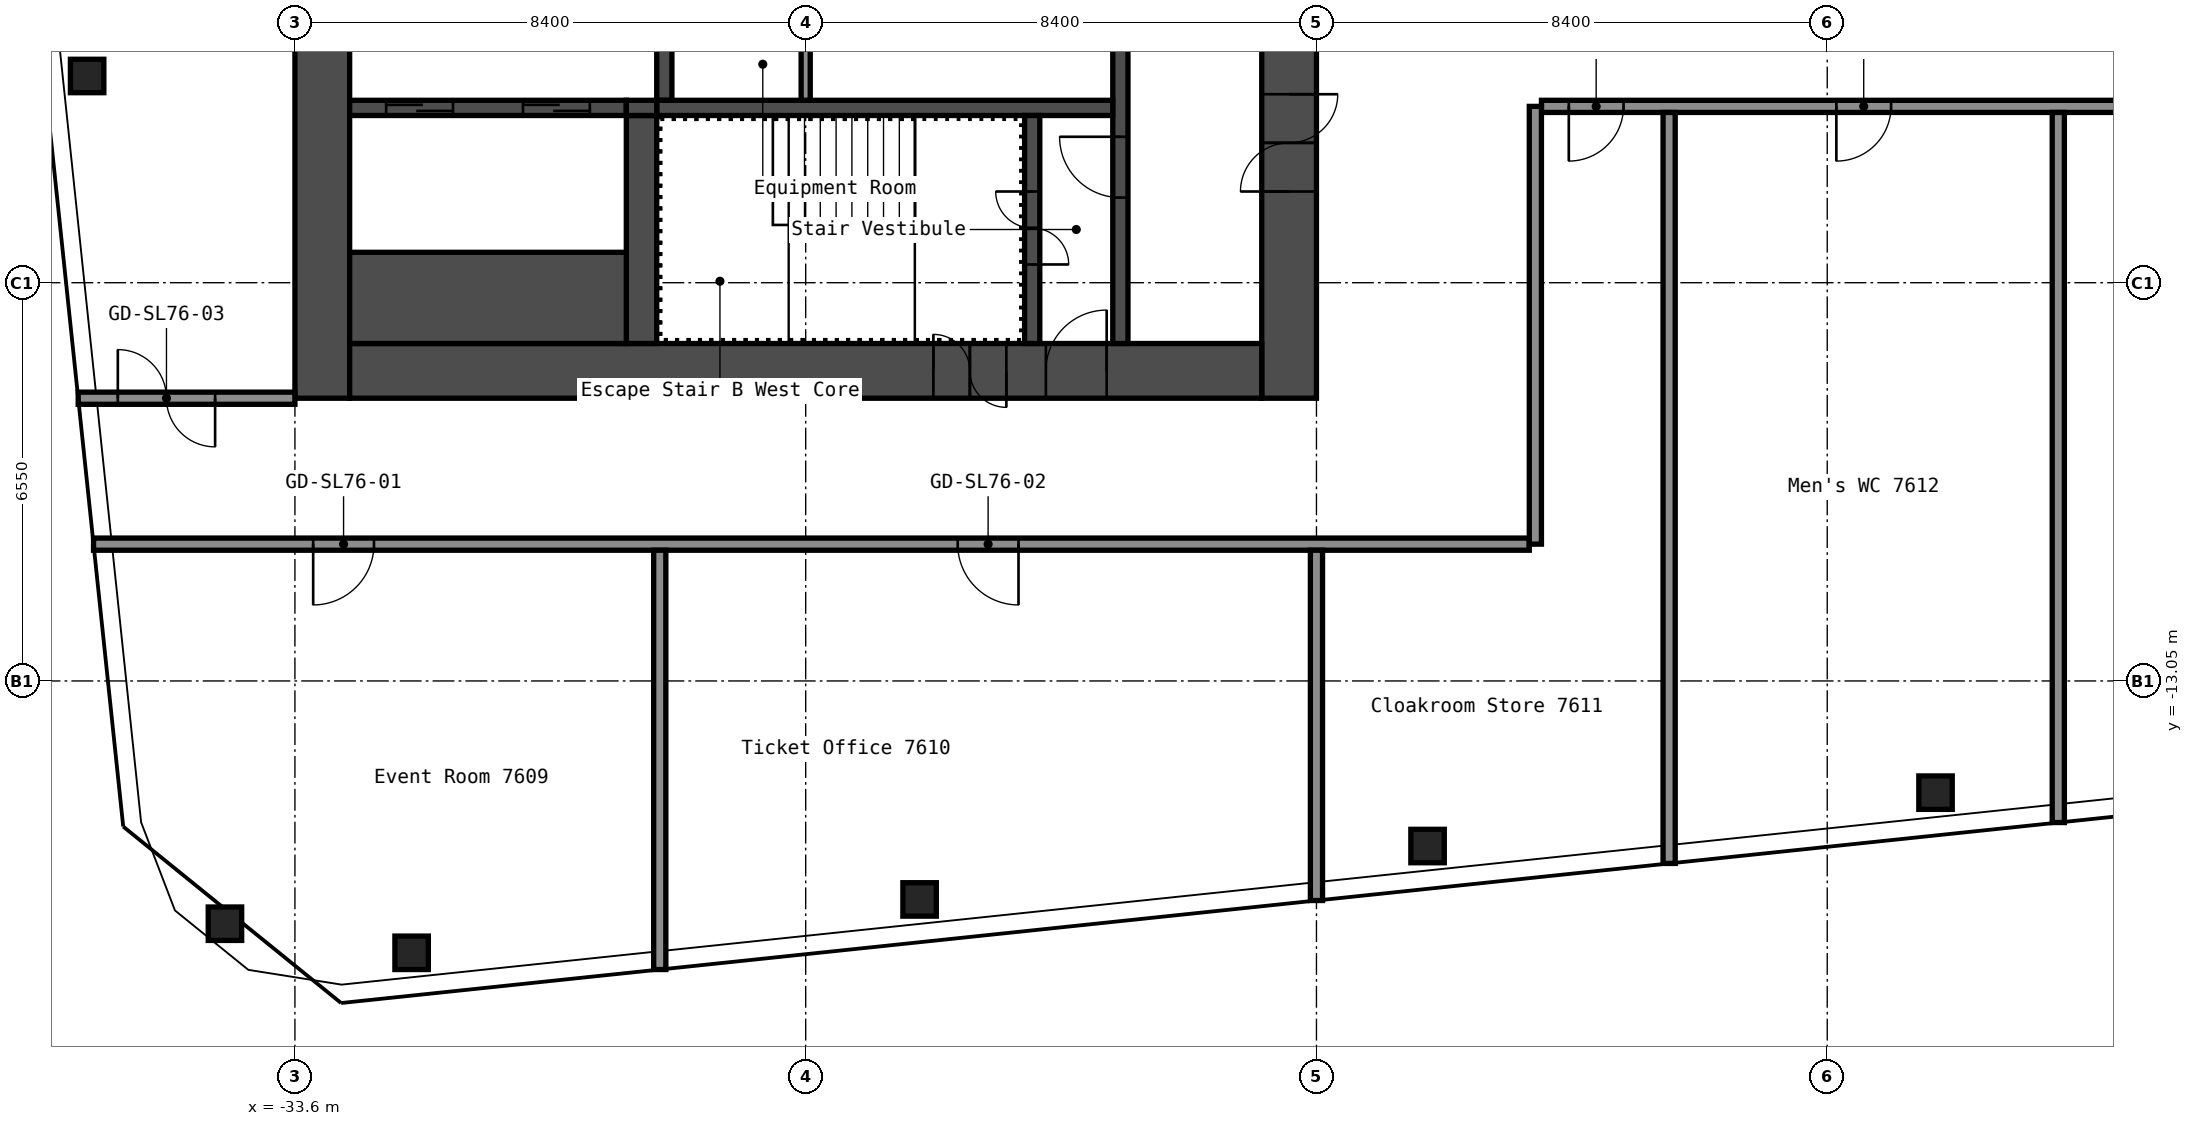
"""IFC4 building model, lengths in metres.
Left out: names, types, materials, properties, quantities, classifications, styles, units other than length and angle.
Written with IfcOpenShell. Run it as: python <this file> out.ifc"""

import sys

from ifc_helpers import new_model, si_unit, direction, frame, frame_2d, origin, origin_2d, place, context, subcontext, project, spatial, rectangle, hollow_rectangle, extrude, element, fill, save


model = new_model("IFC4")
c1 = context("Model", 3, precision=1e-05, world=origin(), true_north=direction((0.0, 1.0)))
c2 = subcontext(c1, "Body", "Model", "MODEL_VIEW")
j1 = project(units=[si_unit("LENGTHUNIT", "METRE"), si_unit("PLANEANGLEUNIT", "RADIAN")], contexts=[c1])
p1 = place(None, origin())
s1 = spatial("IfcSite", under=j1, at=p1, CompositionType="ELEMENT")
p2 = place(p1, origin())
s2 = spatial("IfcBuilding", under=s1, at=p2, CompositionType="ELEMENT")
p3 = place(p2, frame((0.0, 0.0, 270.6)))
s3 = spatial("IfcBuildingStorey", under=s2, at=p3, CompositionType="ELEMENT", Elevation=270.6)
for number, where, z_axis, x_axis in (
    (1, (-34.751, -17.042, 0.0), (0.0, 0.0, 1.0), (1.0, 0.0, 0.0)),
    (2, (-37.017, -3.1, 0.0), (0.0, 0.0, 1.0), (1.0, 0.0, 0.0)),
    (3, (-31.681, -17.521, 0.0), (0.0, 0.0, 1.0), (1.0, 0.0, 0.0)),
    (4, (-23.327, -16.643, 0.0), (0.0, 0.0, 1.0), (1.0, 0.0, 0.0)),
    (5, (-14.973, -15.765, 0.0), (0.0, 0.0, 1.0), (1.0, 0.0, 0.0)),
    (6, (-6.619, -14.887, 0.0), (0.0, 0.0, 1.0), (1.0, 0.0, 0.0)),
):
    element("IfcColumn", number, at=place(p3, frame(where, z_axis=z_axis, x_axis=x_axis)), inside=s3, PredefinedType="COLUMN", context=c2, shape_type="SweptSolid", body=[
        extrude(hollow_rectangle(XDim=0.55, YDim=0.55, WallThickness=0.022, InnerFilletRadius=0.033, OuterFilletRadius=0.055, at=origin_2d()), origin(), (0.0, 0.0, 1.0), 5.55),
    ])
p4 = place(p3, frame((-17.25, -8.4, 0.0), z_axis=(0.0, 0.0, 1.0), x_axis=(0.0, 1.0, 0.0)))
e7 = element("IfcWall", 7, at=p4, inside=s3, PredefinedType="SHEAR", context=c2, shape_type="SweptSolid", body=[
    extrude(rectangle(XDim=16.8, YDim=0.9, at=frame_2d((8.4, 0.0))), origin(), (0.0, 0.0, 1.0), 5.55),
])
p5 = place(p4, frame((3.4, 0.0, 0.0)))
e8 = element("IfcOpeningElement", 8, at=p5, cuts=e7, PredefinedType="OPENING", context=c2, shape_type="SweptSolid", body=[
    extrude(rectangle(XDim=1.6, YDim=2.1, at=frame_2d((0.8, 1.05))), frame((0.0, 0.46, 0.0), z_axis=(0.0, -1.0, 0.0), x_axis=(1.0, 0.0, 0.0)), (0.0, 0.0, 1.0), 0.92),
])
p6 = place(p4, frame((9.6, 0.0, 0.0)))
e9 = element("IfcOpeningElement", 9, at=p6, cuts=e7, PredefinedType="OPENING", context=c2, shape_type="SweptSolid", body=[
    extrude(rectangle(XDim=1.6, YDim=2.1, at=frame_2d((0.8, 1.05))), frame((0.0, 0.46, 0.0), z_axis=(0.0, -1.0, 0.0), x_axis=(1.0, 0.0, 0.0)), (0.0, 0.0, 1.0), 0.92),
])
p7 = place(p4, frame((11.8, 0.0, 0.0)))
e10 = element("IfcOpeningElement", 10, at=p7, cuts=e7, PredefinedType="OPENING", context=c2, shape_type="SweptSolid", body=[
    extrude(rectangle(XDim=1.6, YDim=2.1, at=frame_2d((0.8, 1.05))), frame((0.0, 0.46, 0.0), z_axis=(0.0, -1.0, 0.0), x_axis=(1.0, 0.0, 0.0)), (0.0, 0.0, 1.0), 0.92),
])
p8 = place(p3, frame((-33.15, -8.4, 0.0), z_axis=(0.0, 0.0, 1.0), x_axis=(0.0, 1.0, 0.0)))
e11 = element("IfcWall", 11, at=p8, inside=s3, PredefinedType="SHEAR", context=c2, shape_type="SweptSolid", body=[
    extrude(rectangle(XDim=16.8, YDim=0.9, at=frame_2d((8.4, 0.0))), origin(), (0.0, 0.0, 1.0), 5.55),
])
p9 = place(p3, frame((-32.7, -7.95, 0.0), z_axis=(0.0, 0.0, 1.0), x_axis=(1.0, 0.0, 0.0)))
e12 = element("IfcWall", 12, at=p9, inside=s3, PredefinedType="SHEAR", context=c2, shape_type="SweptSolid", body=[
    extrude(rectangle(XDim=15.0, YDim=0.9, at=frame_2d((7.5, 0.0))), origin(), (0.0, 0.0, 1.0), 5.55),
])
p10 = place(p9, frame((11.45, 0.0, 0.0)))
e13 = element("IfcOpeningElement", 13, at=p10, cuts=e12, PredefinedType="OPENING", context=c2, shape_type="SweptSolid", body=[
    extrude(rectangle(XDim=1.0, YDim=2.1, at=frame_2d((0.5, 1.05))), frame((0.0, 0.46, 0.0), z_axis=(0.0, -1.0, 0.0), x_axis=(1.0, 0.0, 0.0)), (0.0, 0.0, 1.0), 0.92),
])
p11 = place(p9, frame((9.6, 0.0, 0.0)))
e14 = element("IfcOpeningElement", 14, at=p11, cuts=e12, PredefinedType="OPENING", context=c2, shape_type="SweptSolid", body=[
    extrude(rectangle(XDim=1.2, YDim=2.1, at=frame_2d((0.6, 1.05))), frame((0.0, 0.46, 0.0), z_axis=(0.0, -1.0, 0.0), x_axis=(1.0, 0.0, 0.0)), (0.0, 0.0, 1.0), 0.92),
])
p12 = place(p3, frame((-20.025, -7.5, 0.0), z_axis=(0.0, 0.0, 1.0), x_axis=(0.0, 1.0, 0.0)))
e15 = element("IfcWall", 15, at=p12, inside=s3, PredefinedType="SHEAR", context=c2, shape_type="SweptSolid", body=[
    extrude(rectangle(XDim=6.3, YDim=0.25, at=frame_2d((3.15, 0.0))), origin(), (0.0, 0.0, 1.0), 5.55),
])
p13 = place(p12, frame((2.4, 0.0, 0.0)))
e16 = element("IfcOpeningElement", 16, at=p13, cuts=e15, PredefinedType="OPENING", context=c2, shape_type="SweptSolid", body=[
    extrude(rectangle(XDim=1.0, YDim=2.1, at=frame_2d((0.5, 1.05))), frame((0.0, 0.135, 0.0), z_axis=(0.0, -1.0, 0.0), x_axis=(1.0, 0.0, 0.0)), (0.0, 0.0, 1.0), 0.27),
])
p14 = place(p3, frame((-27.525, -3.5, 0.0), z_axis=(0.0, 0.0, 1.0), x_axis=(0.0, 1.0, 0.0)))
e17 = element("IfcWall", 17, at=p14, inside=s3, PredefinedType="SHEAR", context=c2, shape_type="SweptSolid", body=[
    extrude(rectangle(XDim=2.05, YDim=0.25, at=frame_2d((1.025, 0.0))), origin(), (0.0, 0.0, 1.0), 5.55),
])
p15 = place(p3, frame((-27.65, -3.625, 0.0), z_axis=(0.0, 0.0, 1.0), x_axis=(1.0, 0.0, 0.0)))
e18 = element("IfcWall", 18, at=p15, inside=s3, PredefinedType="SHEAR", context=c2, shape_type="SweptSolid", body=[
    extrude(rectangle(XDim=7.5, YDim=0.25, at=frame_2d((3.75, 0.0))), origin(), (0.0, 0.0, 1.0), 5.55),
])
p16 = place(p3, frame((-21.475, -7.5, 0.0), z_axis=(0.0, 0.0, 1.0), x_axis=(0.0, 1.0, 0.0)))
e19 = element("IfcWall", 19, at=p16, inside=s3, PredefinedType="SHEAR", context=c2, shape_type="SweptSolid", body=[
    extrude(rectangle(XDim=3.75, YDim=0.25, at=frame_2d((1.875, 0.0))), origin(), (0.0, 0.0, 1.0), 5.55),
])
p17 = place(p16, frame((1.3, 0.0, 0.0)))
e20 = element("IfcOpeningElement", 20, at=p17, cuts=e19, PredefinedType="OPENING", context=c2, shape_type="SweptSolid", body=[
    extrude(rectangle(XDim=1.2, YDim=2.1, at=frame_2d((0.6, 1.05))), frame((0.0, 0.135, 0.0), z_axis=(0.0, -1.0, 0.0), x_axis=(1.0, 0.0, 0.0)), (0.0, 0.0, 1.0), 0.27),
])
p18 = place(p3, frame((-27.9, -7.5, 0.0), z_axis=(0.0, 0.0, 1.0), x_axis=(0.0, 1.0, 0.0)))
e21 = element("IfcWall", 21, at=p18, inside=s3, PredefinedType="SHEAR", context=c2, shape_type="SweptSolid", body=[
    extrude(rectangle(XDim=3.75, YDim=0.5, at=frame_2d((1.875, 0.0))), origin(), (0.0, 0.0, 1.0), 5.55),
])
p19 = place(p3, frame((-32.7, -3.625, 0.0), z_axis=(0.0, 0.0, 1.0), x_axis=(1.0, 0.0, 0.0)))
e22 = element("IfcWall", 22, at=p19, inside=s3, PredefinedType="SHEAR", context=c2, shape_type="SweptSolid", body=[
    extrude(rectangle(XDim=4.55, YDim=0.25, at=frame_2d((2.275, 0.0))), origin(), (0.0, 0.0, 1.0), 5.55),
])
p20 = place(p19, frame((2.85, 0.0, 0.0)))
e23 = element("IfcOpeningElement", 23, at=p20, cuts=e22, PredefinedType="OPENING", context=c2, shape_type="SweptSolid", body=[
    extrude(rectangle(XDim=1.1, YDim=2.1, at=frame_2d((0.55, 1.05))), frame((0.0, 0.135, 0.0), z_axis=(0.0, -1.0, 0.0), x_axis=(1.0, 0.0, 0.0)), (0.0, 0.0, 1.0), 0.27),
])
p21 = place(p19, frame((0.6, 0.0, 0.0)))
e24 = element("IfcOpeningElement", 24, at=p21, cuts=e22, PredefinedType="OPENING", context=c2, shape_type="SweptSolid", body=[
    extrude(rectangle(XDim=1.1, YDim=2.1, at=frame_2d((0.55, 1.05))), frame((0.0, 0.135, 0.0), z_axis=(0.0, -1.0, 0.0), x_axis=(1.0, 0.0, 0.0)), (0.0, 0.0, 1.0), 0.27),
])
p22 = place(p3, frame((-32.7, -6.75, 0.0), z_axis=(0.0, 0.0, 1.0), x_axis=(1.0, 0.0, 0.0)))
e25 = element("IfcWall", 25, at=p22, inside=s3, PredefinedType="SHEAR", context=c2, shape_type="SweptSolid", body=[
    extrude(rectangle(XDim=4.55, YDim=1.5, at=frame_2d((2.275, 0.0))), origin(), (0.0, 0.0, 1.0), 5.55),
])
p23 = place(p3, frame((-28.15, -3.625, 0.0), z_axis=(0.0, 0.0, 1.0), x_axis=(1.0, 0.0, 0.0)))
e26 = element("IfcWall", 26, at=p23, inside=s3, PredefinedType="SHEAR", context=c2, shape_type="SweptSolid", body=[
    extrude(rectangle(XDim=0.5, YDim=0.25, at=frame_2d((0.25, 0.0))), origin(), (0.0, 0.0, 1.0), 5.55),
])
p24 = place(p3, frame((-25.2, -3.5, 0.0), z_axis=(0.0, 0.0, 1.0), x_axis=(0.0, 1.0, 0.0)))
e27 = element("IfcWall", 27, at=p24, inside=s3, PredefinedType="PARTITIONING", context=c2, shape_type="SweptSolid", body=[
    extrude(rectangle(XDim=2.05, YDim=0.15, at=frame_2d((1.025, 0.0))), origin(), (0.0, 0.0, 1.0), 5.55),
])
p25 = place(p3, frame((-36.912, -10.8, 0.0), z_axis=(0.0, 0.0, 1.0), x_axis=(1.0, 0.0, 0.0)))
e28 = element("IfcWall", 28, at=p25, inside=s3, PredefinedType="PARTITIONING", context=c2, shape_type="SweptSolid", body=[
    extrude(rectangle(XDim=23.612, YDim=0.2, at=frame_2d((11.806, 0.0))), origin(), (0.0, 0.0, 1.0), 5.55),
])
p26 = place(p25, frame((3.612, 0.0, 0.0)))
e29 = element("IfcOpeningElement", 29, at=p26, cuts=e28, PredefinedType="OPENING", context=c2, shape_type="SweptSolid", body=[
    extrude(rectangle(XDim=1.0, YDim=2.1, at=frame_2d((0.5, 1.05))), frame((0.0, 0.11, 0.0), z_axis=(0.0, -1.0, 0.0), x_axis=(1.0, 0.0, 0.0)), (0.0, 0.0, 1.0), 0.22),
])
p27 = place(p25, frame((14.212, 0.0, 0.0)))
e30 = element("IfcOpeningElement", 30, at=p27, cuts=e28, PredefinedType="OPENING", context=c2, shape_type="SweptSolid", body=[
    extrude(rectangle(XDim=1.0, YDim=2.1, at=frame_2d((0.5, 1.05))), frame((0.0, 0.11, 0.0), z_axis=(0.0, -1.0, 0.0), x_axis=(1.0, 0.0, 0.0)), (0.0, 0.0, 1.0), 0.22),
])
p28 = place(p3, frame((-37.164, -8.4, 0.0), z_axis=(0.0, 0.0, 1.0), x_axis=(1.0, 0.0, 0.0)))
e31 = element("IfcWall", 31, at=p28, inside=s3, PredefinedType="PARTITIONING", context=c2, shape_type="SweptSolid", body=[
    extrude(rectangle(XDim=3.564, YDim=0.2, at=frame_2d((1.782, 0.0))), origin(), (0.0, 0.0, 1.0), 5.55),
])
p29 = place(p28, frame((0.652, 0.0, 0.0)))
e32 = element("IfcOpeningElement", 32, at=p29, cuts=e31, PredefinedType="OPENING", context=c2, shape_type="SweptSolid", body=[
    extrude(rectangle(XDim=1.6, YDim=2.1, at=frame_2d((0.8, 1.05))), frame((0.0, 0.11, 0.0), z_axis=(0.0, -1.0, 0.0), x_axis=(1.0, 0.0, 0.0)), (0.0, 0.0, 1.0), 0.22),
])
p30 = place(p3, frame((-13.1, -3.6, 0.0), z_axis=(0.0, 0.0, 1.0), x_axis=(1.0, 0.0, 0.0)))
e33 = element("IfcWall", 33, at=p30, inside=s3, PredefinedType="PARTITIONING", context=c2, shape_type="SweptSolid", body=[
    extrude(rectangle(XDim=15.2, YDim=0.2, at=frame_2d((7.6, 0.0))), origin(), (0.0, 0.0, 1.0), 5.55),
])
p31 = place(p30, frame((0.45, 0.0, 0.0)))
e34 = element("IfcOpeningElement", 34, at=p31, cuts=e33, PredefinedType="OPENING", context=c2, shape_type="SweptSolid", body=[
    extrude(rectangle(XDim=0.9, YDim=2.1, at=frame_2d((0.45, 1.05))), frame((0.0, 0.11, 0.0), z_axis=(0.0, -1.0, 0.0), x_axis=(1.0, 0.0, 0.0)), (0.0, 0.0, 1.0), 0.22),
])
p32 = place(p30, frame((4.85, 0.0, 0.0)))
e35 = element("IfcOpeningElement", 35, at=p32, cuts=e33, PredefinedType="OPENING", context=c2, shape_type="SweptSolid", body=[
    extrude(rectangle(XDim=0.9, YDim=2.1, at=frame_2d((0.45, 1.05))), frame((0.0, 0.11, 0.0), z_axis=(0.0, -1.0, 0.0), x_axis=(1.0, 0.0, 0.0)), (0.0, 0.0, 1.0), 0.22),
])
p33 = place(p30, frame((11.45, 0.0, 0.0)))
e36 = element("IfcOpeningElement", 36, at=p33, cuts=e33, PredefinedType="OPENING", context=c2, shape_type="SweptSolid", body=[
    extrude(rectangle(XDim=0.9, YDim=2.1, at=frame_2d((0.45, 1.05))), frame((0.0, 0.11, 0.0), z_axis=(0.0, -1.0, 0.0), x_axis=(1.0, 0.0, 0.0)), (0.0, 0.0, 1.0), 0.22),
])
p34 = place(p3, frame((-27.6, -17.796, 0.0), z_axis=(0.0, 0.0, 1.0), x_axis=(0.0, 1.0, 0.0)))
e37 = element("IfcWall", 37, at=p34, inside=s3, PredefinedType="PARTITIONING", context=c2, shape_type="SweptSolid", body=[
    extrude(rectangle(XDim=6.896, YDim=0.2, at=frame_2d((3.448, 0.0))), origin(), (0.0, 0.0, 1.0), 5.55),
])
p35 = place(p3, frame((-16.8, -16.661, 0.0), z_axis=(0.0, 0.0, 1.0), x_axis=(0.0, 1.0, 0.0)))
e38 = element("IfcWall", 38, at=p35, inside=s3, PredefinedType="PARTITIONING", context=c2, shape_type="SweptSolid", body=[
    extrude(rectangle(XDim=5.761, YDim=0.2, at=frame_2d((2.88, 0.0))), origin(), (0.0, 0.0, 1.0), 5.55),
])
p36 = place(p3, frame((-13.2, -10.8, 0.0), z_axis=(0.0, 0.0, 1.0), x_axis=(0.0, 1.0, 0.0)))
e39 = element("IfcWall", 39, at=p36, inside=s3, PredefinedType="PARTITIONING", context=c2, shape_type="SweptSolid", body=[
    extrude(rectangle(XDim=7.2, YDim=0.2, at=frame_2d((3.6, 0.0))), origin(), (0.0, 0.0, 1.0), 5.55),
])
p37 = place(p3, frame((-11.0, -16.052, 0.0), z_axis=(0.0, 0.0, 1.0), x_axis=(0.0, 1.0, 0.0)))
e40 = element("IfcWall", 40, at=p37, inside=s3, PredefinedType="PARTITIONING", context=c2, shape_type="SweptSolid", body=[
    extrude(rectangle(XDim=12.352, YDim=0.2, at=frame_2d((6.176, 0.0))), origin(), (0.0, 0.0, 1.0), 5.55),
])
p38 = place(p3, frame((-4.6, -15.379, 0.0), z_axis=(0.0, 0.0, 1.0), x_axis=(0.0, 1.0, 0.0)))
e41 = element("IfcWall", 41, at=p38, inside=s3, PredefinedType="PARTITIONING", context=c2, shape_type="SweptSolid", body=[
    extrude(rectangle(XDim=11.679, YDim=0.2, at=frame_2d((5.839, 0.0))), origin(), (0.0, 0.0, 1.0), 5.55),
])
p39 = place(p5, origin())
e42 = element("IfcDoor", 42, at=p39, inside=s3, OperationType="DOUBLE_DOOR_SINGLE_SWING", PredefinedType="DOOR", context=c2, shape_type="SweptSolid", body=[
    extrude(rectangle(XDim=1.6, YDim=2.1, at=frame_2d((0.8, 1.05))), frame((0.0, 0.025, 0.0), z_axis=(0.0, -1.0, 0.0), x_axis=(1.0, 0.0, 0.0)), (0.0, 0.0, 1.0), 0.05),
])
fill(e8, e42)
p40 = place(p10, origin())
e43 = element("IfcDoor", 43, at=p40, inside=s3, OperationType="SINGLE_SWING_LEFT", PredefinedType="DOOR", context=c2, shape_type="SweptSolid", body=[
    extrude(rectangle(XDim=1.0, YDim=2.1, at=frame_2d((0.5, 1.05))), frame((0.0, 0.025, 0.0), z_axis=(0.0, -1.0, 0.0), x_axis=(1.0, 0.0, 0.0)), (0.0, 0.0, 1.0), 0.05),
])
fill(e13, e43)
p41 = place(p11, origin())
e44 = element("IfcDoor", 44, at=p41, inside=s3, OperationType="DOUBLE_DOOR_SINGLE_SWING", PredefinedType="DOOR", context=c2, shape_type="SweptSolid", body=[
    extrude(rectangle(XDim=1.2, YDim=2.1, at=frame_2d((0.6, 1.05))), frame((0.0, 0.025, 0.0), z_axis=(0.0, -1.0, 0.0), x_axis=(1.0, 0.0, 0.0)), (0.0, 0.0, 1.0), 0.05),
])
fill(e14, e44)
p42 = place(p17, origin())
e45 = element("IfcDoor", 45, at=p42, inside=s3, OperationType="DOUBLE_DOOR_SINGLE_SWING", PredefinedType="DOOR", context=c2, shape_type="SweptSolid", body=[
    extrude(rectangle(XDim=1.2, YDim=2.1, at=frame_2d((0.6, 1.05))), frame((0.0, 0.025, 0.0), z_axis=(0.0, -1.0, 0.0), x_axis=(1.0, 0.0, 0.0)), (0.0, 0.0, 1.0), 0.05),
])
fill(e20, e45)
p43 = place(p13, origin())
e46 = element("IfcDoor", 46, at=p43, inside=s3, OperationType="SINGLE_SWING_LEFT", PredefinedType="DOOR", context=c2, shape_type="SweptSolid", body=[
    extrude(rectangle(XDim=1.0, YDim=2.1, at=frame_2d((0.5, 1.05))), frame((0.0, 0.025, 0.0), z_axis=(0.0, -1.0, 0.0), x_axis=(1.0, 0.0, 0.0)), (0.0, 0.0, 1.0), 0.05),
])
fill(e16, e46)
p44 = place(p20, origin())
e47 = element("IfcDoor", 47, at=p44, inside=s3, OperationType="DOUBLE_DOOR_SLIDING", PredefinedType="DOOR", context=c2, shape_type="SweptSolid", body=[
    extrude(rectangle(XDim=1.1, YDim=2.1, at=frame_2d((0.55, 1.05))), frame((0.0, 0.025, 0.0), z_axis=(0.0, -1.0, 0.0), x_axis=(1.0, 0.0, 0.0)), (0.0, 0.0, 1.0), 0.05),
])
fill(e23, e47)
p45 = place(p21, origin())
e48 = element("IfcDoor", 48, at=p45, inside=s3, OperationType="DOUBLE_DOOR_SLIDING", PredefinedType="DOOR", context=c2, shape_type="SweptSolid", body=[
    extrude(rectangle(XDim=1.1, YDim=2.1, at=frame_2d((0.55, 1.05))), frame((0.0, 0.025, 0.0), z_axis=(0.0, -1.0, 0.0), x_axis=(1.0, 0.0, 0.0)), (0.0, 0.0, 1.0), 0.05),
])
fill(e24, e48)
p46 = place(p26, origin())
e49 = element("IfcDoor", 49, at=p46, inside=s3, OperationType="SINGLE_SWING_LEFT", PredefinedType="DOOR", context=c2, shape_type="SweptSolid", body=[
    extrude(rectangle(XDim=1.0, YDim=2.1, at=frame_2d((0.5, 1.05))), frame((0.0, 0.025, 0.0), z_axis=(0.0, -1.0, 0.0), x_axis=(1.0, 0.0, 0.0)), (0.0, 0.0, 1.0), 0.05),
])
fill(e29, e49)
p47 = place(p27, origin())
e50 = element("IfcDoor", 50, at=p47, inside=s3, OperationType="SINGLE_SWING_RIGHT", PredefinedType="DOOR", context=c2, shape_type="SweptSolid", body=[
    extrude(rectangle(XDim=1.0, YDim=2.1, at=frame_2d((0.5, 1.05))), frame((0.0, 0.025, 0.0), z_axis=(0.0, -1.0, 0.0), x_axis=(1.0, 0.0, 0.0)), (0.0, 0.0, 1.0), 0.05),
])
fill(e30, e50)
p48 = place(p29, origin())
e51 = element("IfcDoor", 51, at=p48, inside=s3, OperationType="DOUBLE_DOOR_SINGLE_SWING", PredefinedType="DOOR", context=c2, shape_type="SweptSolid", body=[
    extrude(rectangle(XDim=1.6, YDim=2.1, at=frame_2d((0.8, 1.05))), frame((0.0, 0.025, 0.0), z_axis=(0.0, -1.0, 0.0), x_axis=(1.0, 0.0, 0.0)), (0.0, 0.0, 1.0), 0.05),
])
fill(e32, e51)
p49 = place(p31, origin())
e52 = element("IfcDoor", 52, at=p49, inside=s3, OperationType="SINGLE_SWING_LEFT", PredefinedType="DOOR", context=c2, shape_type="SweptSolid", body=[
    extrude(rectangle(XDim=0.9, YDim=2.1, at=frame_2d((0.45, 1.05))), frame((0.0, 0.025, 0.0), z_axis=(0.0, -1.0, 0.0), x_axis=(1.0, 0.0, 0.0)), (0.0, 0.0, 1.0), 0.05),
])
fill(e34, e52)
p50 = place(p32, origin())
e53 = element("IfcDoor", 53, at=p50, inside=s3, OperationType="SINGLE_SWING_LEFT", PredefinedType="DOOR", context=c2, shape_type="SweptSolid", body=[
    extrude(rectangle(XDim=0.9, YDim=2.1, at=frame_2d((0.45, 1.05))), frame((0.0, 0.025, 0.0), z_axis=(0.0, -1.0, 0.0), x_axis=(1.0, 0.0, 0.0)), (0.0, 0.0, 1.0), 0.05),
])
fill(e35, e53)
save(model, sys.argv[1])
